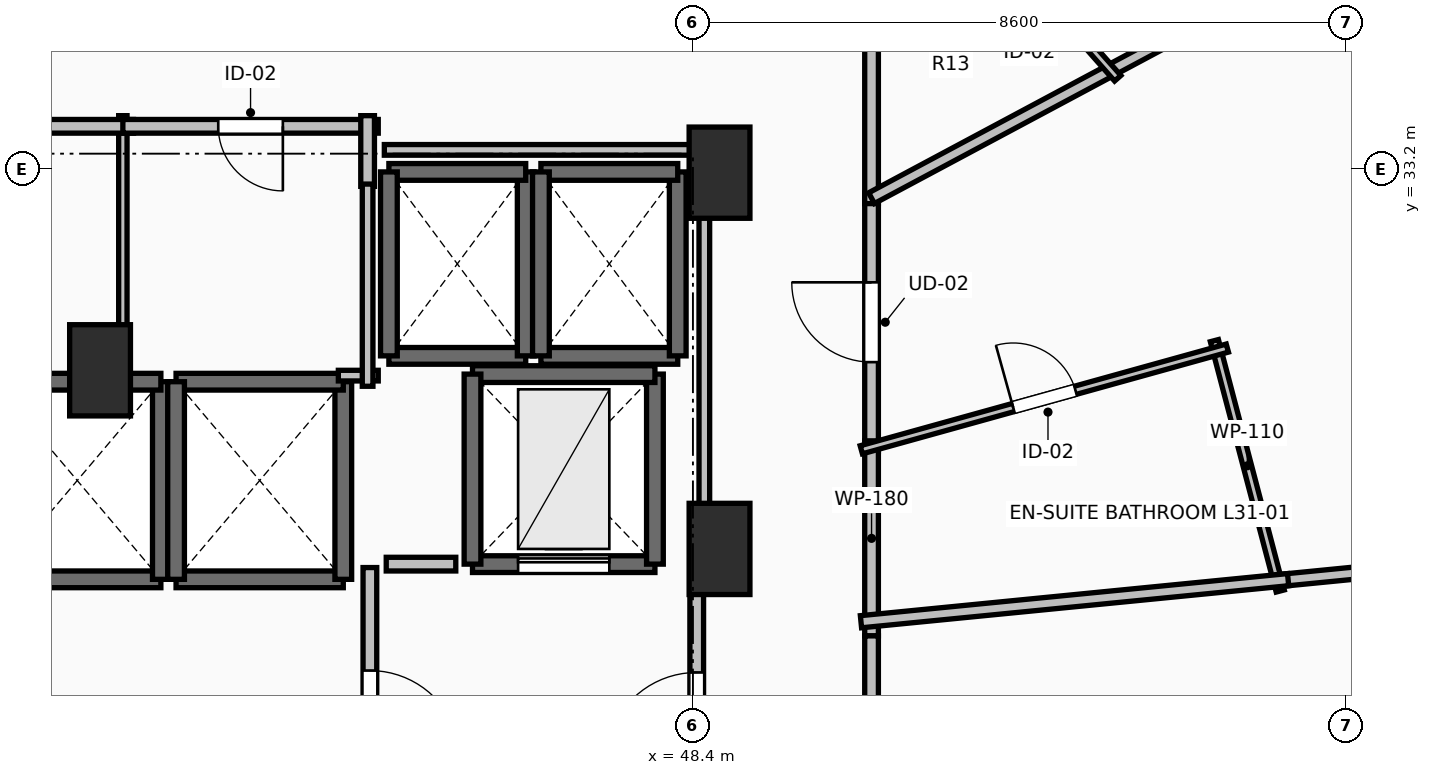
"""IFC4 building model, lengths in metres.
Left out: names, types, materials, properties, quantities, classifications, styles, units other than length and angle.
Written with IfcOpenShell. Run it as: python <this file> out.ifc"""

import sys

from ifc_helpers import new_model, si_unit, direction, frame, frame_2d, origin, origin_2d, place, context, subcontext, project, spatial, rectangle, extrude, element, fill, save


model = new_model("IFC4")
c1 = context("Model", 3, precision=1e-05, world=origin(), true_north=direction((0.0, 1.0)))
c2 = subcontext(c1, "Body", "Model", "MODEL_VIEW")
j1 = project(units=[si_unit("LENGTHUNIT", "METRE"), si_unit("PLANEANGLEUNIT", "RADIAN")], contexts=[c1])
p1 = place(None, origin())
s1 = spatial("IfcSite", under=j1, at=p1, CompositionType="ELEMENT")
p2 = place(p1, origin())
s2 = spatial("IfcBuilding", under=s1, at=p2, CompositionType="ELEMENT")
p3 = place(p2, frame((0.0, 0.0, 117.3)))
s3 = spatial("IfcBuildingStorey", under=s2, at=p3, CompositionType="ELEMENT", Elevation=117.3)
for number, where, z_axis, x_axis in (
    (1, (48.75, 33.15, 0.0), (0.0, 0.0, 1.0), (1.0, 0.0, 0.0)),
    (2, (48.75, 28.2, 0.0), (0.0, 0.0, 1.0), (1.0, 0.0, 0.0)),
    (3, (40.6, 30.55, 0.0), (0.0, 0.0, 1.0), (1.0, 0.0, 0.0)),
):
    element("IfcColumn", number, at=place(p3, frame(where, z_axis=z_axis, x_axis=x_axis)), inside=s3, PredefinedType="PILASTER", context=c2, shape_type="SweptSolid", body=[
        extrude(rectangle(XDim=0.8, YDim=1.2, at=origin_2d()), origin(), (0.0, 0.0, 1.0), 3.5),
    ])
p4 = place(p3, frame((39.2, 27.8, 0.0), z_axis=(0.0, 0.0, 1.0), x_axis=(1.0, 0.0, 0.0)))
e4 = element("IfcWall", 4, at=p4, inside=s3, PredefinedType="SOLIDWALL", context=c2, shape_type="SweptSolid", body=[
    extrude(rectangle(XDim=2.2, YDim=0.22, at=frame_2d((1.1, 0.0))), origin(), (0.0, 0.0, 1.0), 3.24),
])
p5 = place(p3, frame((41.4, 27.8, 0.0), z_axis=(0.0, 0.0, 1.0), x_axis=(0.0, 1.0, 0.0)))
e5 = element("IfcWall", 5, at=p5, inside=s3, PredefinedType="SOLIDWALL", context=c2, shape_type="SweptSolid", body=[
    extrude(rectangle(XDim=2.6, YDim=0.22, at=frame_2d((1.3, 0.0))), origin(), (0.0, 0.0, 1.0), 3.24),
])
for number, where, z_axis, x_axis in (
    (6, (41.4, 30.4, 0.0), (0.0, 0.0, 1.0), (-1.0, 0.0, 0.0)),
    (7, (41.6, 27.8, 0.0), (0.0, 0.0, 1.0), (1.0, 0.0, 0.0)),
):
    element("IfcWall", number, at=place(p3, frame(where, z_axis=z_axis, x_axis=x_axis)), inside=s3, PredefinedType="SOLIDWALL", context=c2, shape_type="SweptSolid", body=[
        extrude(rectangle(XDim=2.2, YDim=0.22, at=frame_2d((1.1, 0.0))), origin(), (0.0, 0.0, 1.0), 3.24),
    ])
p6 = place(p3, frame((43.8, 27.8, 0.0), z_axis=(0.0, 0.0, 1.0), x_axis=(0.0, 1.0, 0.0)))
e8 = element("IfcWall", 8, at=p6, inside=s3, PredefinedType="SOLIDWALL", context=c2, shape_type="SweptSolid", body=[
    extrude(rectangle(XDim=2.6, YDim=0.22, at=frame_2d((1.3, 0.0))), origin(), (0.0, 0.0, 1.0), 3.24),
])
p7 = place(p3, frame((43.8, 30.4, 0.0), z_axis=(0.0, 0.0, 1.0), x_axis=(-1.0, 0.0, 0.0)))
e9 = element("IfcWall", 9, at=p7, inside=s3, PredefinedType="SOLIDWALL", context=c2, shape_type="SweptSolid", body=[
    extrude(rectangle(XDim=2.2, YDim=0.22, at=frame_2d((1.1, 0.0))), origin(), (0.0, 0.0, 1.0), 3.24),
])
p8 = place(p3, frame((41.6, 30.4, 0.0), z_axis=(0.0, 0.0, 1.0), x_axis=(0.0, -1.0, 0.0)))
e10 = element("IfcWall", 10, at=p8, inside=s3, PredefinedType="SOLIDWALL", context=c2, shape_type="SweptSolid", body=[
    extrude(rectangle(XDim=2.6, YDim=0.22, at=frame_2d((1.3, 0.0))), origin(), (0.0, 0.0, 1.0), 3.24),
])
p9 = place(p3, frame((44.4, 30.74, 0.0), z_axis=(0.0, 0.0, 1.0), x_axis=(1.0, 0.0, 0.0)))
e11 = element("IfcWall", 11, at=p9, inside=s3, PredefinedType="SOLIDWALL", context=c2, shape_type="SweptSolid", body=[
    extrude(rectangle(XDim=1.8, YDim=0.22, at=frame_2d((0.9, 0.0))), origin(), (0.0, 0.0, 1.0), 3.24),
])
p10 = place(p3, frame((46.2, 30.74, 0.0), z_axis=(0.0, 0.0, 1.0), x_axis=(0.0, 1.0, 0.0)))
e12 = element("IfcWall", 12, at=p10, inside=s3, PredefinedType="SOLIDWALL", context=c2, shape_type="SweptSolid", body=[
    extrude(rectangle(XDim=2.42, YDim=0.22, at=frame_2d((1.21, 0.0))), origin(), (0.0, 0.0, 1.0), 3.24),
])
p11 = place(p3, frame((46.2, 33.16, 0.0), z_axis=(0.0, 0.0, 1.0), x_axis=(-1.0, 0.0, 0.0)))
e13 = element("IfcWall", 13, at=p11, inside=s3, PredefinedType="SOLIDWALL", context=c2, shape_type="SweptSolid", body=[
    extrude(rectangle(XDim=1.8, YDim=0.22, at=frame_2d((0.9, 0.0))), origin(), (0.0, 0.0, 1.0), 3.24),
])
p12 = place(p3, frame((44.4, 33.16, 0.0), z_axis=(0.0, 0.0, 1.0), x_axis=(0.0, -1.0, 0.0)))
e14 = element("IfcWall", 14, at=p12, inside=s3, PredefinedType="SOLIDWALL", context=c2, shape_type="SweptSolid", body=[
    extrude(rectangle(XDim=2.42, YDim=0.22, at=frame_2d((1.21, 0.0))), origin(), (0.0, 0.0, 1.0), 3.24),
])
p13 = place(p3, frame((46.4, 30.74, 0.0), z_axis=(0.0, 0.0, 1.0), x_axis=(1.0, 0.0, 0.0)))
e15 = element("IfcWall", 15, at=p13, inside=s3, PredefinedType="SOLIDWALL", context=c2, shape_type="SweptSolid", body=[
    extrude(rectangle(XDim=1.8, YDim=0.22, at=frame_2d((0.9, 0.0))), origin(), (0.0, 0.0, 1.0), 3.24),
])
p14 = place(p3, frame((48.2, 30.74, 0.0), z_axis=(0.0, 0.0, 1.0), x_axis=(0.0, 1.0, 0.0)))
e16 = element("IfcWall", 16, at=p14, inside=s3, PredefinedType="SOLIDWALL", context=c2, shape_type="SweptSolid", body=[
    extrude(rectangle(XDim=2.42, YDim=0.22, at=frame_2d((1.21, 0.0))), origin(), (0.0, 0.0, 1.0), 3.24),
])
p15 = place(p3, frame((48.2, 33.16, 0.0), z_axis=(0.0, 0.0, 1.0), x_axis=(-1.0, 0.0, 0.0)))
e17 = element("IfcWall", 17, at=p15, inside=s3, PredefinedType="SOLIDWALL", context=c2, shape_type="SweptSolid", body=[
    extrude(rectangle(XDim=1.8, YDim=0.22, at=frame_2d((0.9, 0.0))), origin(), (0.0, 0.0, 1.0), 3.24),
])
p16 = place(p3, frame((46.4, 33.16, 0.0), z_axis=(0.0, 0.0, 1.0), x_axis=(0.0, -1.0, 0.0)))
e18 = element("IfcWall", 18, at=p16, inside=s3, PredefinedType="SOLIDWALL", context=c2, shape_type="SweptSolid", body=[
    extrude(rectangle(XDim=2.42, YDim=0.22, at=frame_2d((1.21, 0.0))), origin(), (0.0, 0.0, 1.0), 3.24),
])
p17 = place(p3, frame((45.5, 28.0, 0.0), z_axis=(0.0, 0.0, 1.0), x_axis=(1.0, 0.0, 0.0)))
e19 = element("IfcWall", 19, at=p17, inside=s3, PredefinedType="SHEAR", context=c2, shape_type="SweptSolid", body=[
    extrude(rectangle(XDim=2.4, YDim=0.22, at=frame_2d((1.2, 0.0))), origin(), (0.0, 0.0, 1.0), 3.24),
])
p18 = place(p17, frame((0.6, 0.0, 0.0)))
e20 = element("IfcOpeningElement", 20, at=p18, cuts=e19, PredefinedType="OPENING", context=c2, shape_type="SweptSolid", body=[
    extrude(rectangle(XDim=1.2, YDim=2.2, at=frame_2d((0.6, 1.1))), frame((0.0, 0.125, 0.0), z_axis=(0.0, -1.0, 0.0), x_axis=(1.0, 0.0, 0.0)), (0.0, 0.0, 1.0), 0.25),
])
p19 = place(p3, frame((47.9, 28.0, 0.0), z_axis=(0.0, 0.0, 1.0), x_axis=(0.0, 1.0, 0.0)))
e21 = element("IfcWall", 21, at=p19, inside=s3, PredefinedType="SHEAR", context=c2, shape_type="SweptSolid", body=[
    extrude(rectangle(XDim=2.5, YDim=0.22, at=frame_2d((1.25, 0.0))), origin(), (0.0, 0.0, 1.0), 3.24),
])
p20 = place(p3, frame((47.9, 30.5, 0.0), z_axis=(0.0, 0.0, 1.0), x_axis=(-1.0, 0.0, 0.0)))
e22 = element("IfcWall", 22, at=p20, inside=s3, PredefinedType="SHEAR", context=c2, shape_type="SweptSolid", body=[
    extrude(rectangle(XDim=2.4, YDim=0.22, at=frame_2d((1.2, 0.0))), origin(), (0.0, 0.0, 1.0), 3.24),
])
p21 = place(p3, frame((45.5, 30.5, 0.0), z_axis=(0.0, 0.0, 1.0), x_axis=(0.0, -1.0, 0.0)))
e23 = element("IfcWall", 23, at=p21, inside=s3, PredefinedType="SHEAR", context=c2, shape_type="SweptSolid", body=[
    extrude(rectangle(XDim=2.5, YDim=0.22, at=frame_2d((1.25, 0.0))), origin(), (0.0, 0.0, 1.0), 3.24),
])
p22 = place(p3, frame((44.15, 27.955, 0.0), z_axis=(0.0, 0.0, 1.0), x_axis=(0.0, -1.0, 0.0)))
e24 = element("IfcWall", 24, at=p22, inside=s3, PredefinedType="PARTITIONING", context=c2, shape_type="SweptSolid", body=[
    extrude(rectangle(XDim=3.91, YDim=0.18, at=frame_2d((1.955, 0.0))), origin(), (0.0, 0.0, 1.0), 3.24),
])
p23 = place(p22, frame((1.355, 0.0, 0.0)))
e25 = element("IfcOpeningElement", 25, at=p23, cuts=e24, PredefinedType="OPENING", context=c2, shape_type="SweptSolid", body=[
    extrude(rectangle(XDim=1.2, YDim=2.15, at=frame_2d((0.6, 1.075))), frame((0.0, 0.105, 0.0), z_axis=(0.0, -1.0, 0.0), x_axis=(1.0, 0.0, 0.0)), (0.0, 0.0, 1.0), 0.21),
])
p24 = place(p3, frame((48.45, 23.95, 0.0), z_axis=(0.0, 0.0, 1.0), x_axis=(0.0, 1.0, 0.0)))
e26 = element("IfcWall", 26, at=p24, inside=s3, PredefinedType="PARTITIONING", context=c2, shape_type="SweptSolid", body=[
    extrude(rectangle(XDim=4.05, YDim=0.18, at=frame_2d((2.025, 0.0))), origin(), (0.0, 0.0, 1.0), 3.24),
])
p25 = place(p24, frame((1.425, 0.0, 0.0)))
e27 = element("IfcOpeningElement", 27, at=p25, cuts=e26, PredefinedType="OPENING", context=c2, shape_type="SweptSolid", body=[
    extrude(rectangle(XDim=1.2, YDim=2.15, at=frame_2d((0.6, 1.075))), frame((0.0, 0.105, 0.0), z_axis=(0.0, -1.0, 0.0), x_axis=(1.0, 0.0, 0.0)), (0.0, 0.0, 1.0), 0.21),
])
p26 = place(p3, frame((40.9, 30.34, 0.0), z_axis=(0.0, 0.0, 1.0), x_axis=(0.0, 1.0, 0.0)))
e28 = element("IfcWall", 28, at=p26, inside=s3, PredefinedType="PARTITIONING", context=c2, shape_type="SweptSolid", body=[
    extrude(rectangle(XDim=3.56, YDim=0.11, at=frame_2d((1.78, 0.0))), origin(), (0.0, 0.0, 1.0), 3.24),
])
p27 = place(p3, frame((41.04, 33.76, 0.0), z_axis=(0.0, 0.0, 1.0), x_axis=(-1.0, 0.0, 0.0)))
e29 = element("IfcWall", 29, at=p27, inside=s3, PredefinedType="PARTITIONING", context=c2, shape_type="SweptSolid", body=[
    extrude(rectangle(XDim=4.84, YDim=0.18, at=frame_2d((2.42, 0.0))), origin(), (0.0, 0.0, 1.0), 3.24),
])
p28 = place(p27, frame((1.995, 0.0, 0.0)))
e30 = element("IfcOpeningElement", 30, at=p28, cuts=e29, PredefinedType="OPENING", context=c2, shape_type="SweptSolid", body=[
    extrude(rectangle(XDim=0.85, YDim=2.1, at=frame_2d((0.425, 1.05))), frame((0.0, 0.105, 0.0), z_axis=(0.0, -1.0, 0.0), x_axis=(1.0, 0.0, 0.0)), (0.0, 0.0, 1.0), 0.21),
])
p29 = place(p3, frame((44.26, 33.76, 0.0), z_axis=(0.0, 0.0, 1.0), x_axis=(-1.0, 0.0, 0.0)))
e31 = element("IfcWall", 31, at=p29, inside=s3, PredefinedType="PARTITIONING", context=c2, shape_type="SweptSolid", body=[
    extrude(rectangle(XDim=3.36, YDim=0.18, at=frame_2d((1.68, 0.0))), origin(), (0.0, 0.0, 1.0), 3.24),
])
p30 = place(p29, frame((1.255, 0.0, 0.0)))
e32 = element("IfcOpeningElement", 32, at=p30, cuts=e31, PredefinedType="OPENING", context=c2, shape_type="SweptSolid", body=[
    extrude(rectangle(XDim=0.85, YDim=2.1, at=frame_2d((0.425, 1.05))), frame((0.0, 0.105, 0.0), z_axis=(0.0, -1.0, 0.0), x_axis=(1.0, 0.0, 0.0)), (0.0, 0.0, 1.0), 0.21),
])
p31 = place(p3, frame((44.12, 32.97, 0.0), z_axis=(0.0, 0.0, 1.0), x_axis=(0.0, 1.0, 0.0)))
e33 = element("IfcWall", 33, at=p31, inside=s3, PredefinedType="PARTITIONING", context=c2, shape_type="SweptSolid", body=[
    extrude(rectangle(XDim=0.93, YDim=0.18, at=frame_2d((0.465, 0.0))), origin(), (0.0, 0.0, 1.0), 3.24),
])
p32 = place(p3, frame((50.75, 29.482, 0.0), z_axis=(0.0, 0.0, 1.0), x_axis=(0.0, 1.0, 0.0)))
e34 = element("IfcWall", 34, at=p32, inside=s3, PredefinedType="PARTITIONING", context=c2, shape_type="SweptSolid", body=[
    extrude(rectangle(XDim=3.401, YDim=0.18, at=frame_2d((1.701, 0.0))), origin(), (0.0, 0.0, 1.0), 2.432),
])
p33 = place(p32, frame((1.176, 0.0, 0.0)))
e35 = element("IfcOpeningElement", 35, at=p33, cuts=e34, PredefinedType="OPENING", context=c2, shape_type="SweptSolid", body=[
    extrude(rectangle(XDim=1.05, YDim=2.2, at=frame_2d((0.525, 1.1))), frame((0.0, 0.105, 0.0), z_axis=(0.0, -1.0, 0.0), x_axis=(1.0, 0.0, 0.0)), (0.0, 0.0, 1.0), 0.21),
])
p34 = place(p3, frame((50.75, 27.056, 0.0), z_axis=(0.0, 0.0, 1.0), x_axis=(0.0, 1.0, 0.0)))
e36 = element("IfcWall", 36, at=p34, inside=s3, PredefinedType="PARTITIONING", context=c2, shape_type="SweptSolid", body=[
    extrude(rectangle(XDim=2.566, YDim=0.18, at=frame_2d((1.283, 0.0))), origin(), (0.0, 0.0, 1.0), 2.432),
])
p35 = place(p3, frame((50.75, 32.743, 0.0), z_axis=(0.0, 0.0, 1.0), x_axis=(0.0, 1.0, 0.0)))
e37 = element("IfcWall", 37, at=p35, inside=s3, PredefinedType="PARTITIONING", context=c2, shape_type="SweptSolid", body=[
    extrude(rectangle(XDim=3.347, YDim=0.18, at=frame_2d((1.674, 0.0))), origin(), (0.0, 0.0, 1.0), 2.432),
])
p36 = place(p3, frame((50.75, 15.596, 0.0), z_axis=(0.0, 0.0, 1.0), x_axis=(0.0, 1.0, 0.0)))
e38 = element("IfcWall", 38, at=p36, inside=s3, PredefinedType="PARTITIONING", context=c2, shape_type="SweptSolid", body=[
    extrude(rectangle(XDim=11.46, YDim=0.18, at=frame_2d((5.73, 0.0))), origin(), (0.0, 0.0, 1.0), 2.432),
])
p37 = place(p36, frame((5.23, 0.0, 0.0)))
e39 = element("IfcOpeningElement", 39, at=p37, cuts=e38, PredefinedType="OPENING", context=c2, shape_type="SweptSolid", body=[
    extrude(rectangle(XDim=1.0, YDim=2.15, at=frame_2d((0.5, 1.075))), frame((0.0, 0.105, 0.0), z_axis=(0.0, -1.0, 0.0), x_axis=(1.0, 0.0, 0.0)), (0.0, 0.0, 1.0), 0.21),
])
p38 = place(p3, frame((55.26, 30.94, 0.0), z_axis=(0.0, 0.0, 1.0), x_axis=(0.254323935255, -0.967119090886, 0.0)))
e40 = element("IfcWall", 40, at=p38, inside=s3, PredefinedType="PARTITIONING", context=c2, shape_type="SweptSolid", body=[
    extrude(rectangle(XDim=3.406, YDim=0.11, at=frame_2d((1.703, 0.0))), origin(), (0.0, 0.0, 1.0), 2.929),
])
p39 = place(p3, frame((50.615, 29.504, 0.0), z_axis=(0.0, 0.0, 1.0), x_axis=(0.963498313434, 0.267714400078, 0.0)))
e41 = element("IfcWall", 41, at=p39, inside=s3, PredefinedType="PARTITIONING", context=c2, shape_type="SweptSolid", body=[
    extrude(rectangle(XDim=4.998, YDim=0.11, at=frame_2d((2.499, 0.0))), origin(), (0.0, 0.0, 1.0), 2.874),
])
p40 = place(p39, frame((2.074, 0.0, 0.0)))
e42 = element("IfcOpeningElement", 42, at=p40, cuts=e41, PredefinedType="OPENING", context=c2, shape_type="SweptSolid", body=[
    extrude(rectangle(XDim=0.85, YDim=2.1, at=frame_2d((0.425, 1.05))), frame((0.0, 0.07, 0.0), z_axis=(0.0, -1.0, 0.0), x_axis=(1.0, 0.0, 0.0)), (0.0, 0.0, 1.0), 0.14),
])
p41 = place(p3, frame((59.384, 37.43, 0.0), z_axis=(0.0, 0.0, 1.0), x_axis=(-0.881921122551, -0.471397002109, 0.0)))
e43 = element("IfcWall", 43, at=p41, inside=s3, PredefinedType="PARTITIONING", context=c2, shape_type="SweptSolid", body=[
    extrude(rectangle(XDim=9.79, YDim=0.16, at=frame_2d((4.895, 0.0))), origin(), (0.0, 0.0, 1.0), 2.432),
])
p42 = place(p3, frame((56.091, 27.782, 0.0), z_axis=(0.0, 0.0, 1.0), x_axis=(0.995182127762, 0.098043523927, 0.0)))
e44 = element("IfcWall", 44, at=p42, inside=s3, PredefinedType="PARTITIONING", context=c2, shape_type="SweptSolid", body=[
    extrude(rectangle(XDim=7.864, YDim=0.16, at=frame_2d((3.932, 0.0))), origin(), (0.0, 0.0, 1.0), 2.677),
])
p43 = place(p3, frame((50.611, 27.242, 0.0), z_axis=(0.0, 0.0, 1.0), x_axis=(0.995185043486, 0.098013923607, 0.0)))
e45 = element("IfcWall", 45, at=p43, inside=s3, PredefinedType="PARTITIONING", context=c2, shape_type="SweptSolid", body=[
    extrude(rectangle(XDim=5.647, YDim=0.16, at=frame_2d((2.823, 0.0))), origin(), (0.0, 0.0, 1.0), 2.432),
])
p44 = place(p3, frame((51.936, 36.714, 0.0), z_axis=(0.0, 0.0, 1.0), x_axis=(0.662322264705, -0.749219071885, 0.0)))
e46 = element("IfcWall", 46, at=p44, inside=s3, PredefinedType="PARTITIONING", context=c2, shape_type="SweptSolid", body=[
    extrude(rectangle(XDim=3.099, YDim=0.11, at=frame_2d((1.549, 0.0))), origin(), (0.0, 0.0, 1.0), 2.432),
])
p45 = place(p44, frame((1.125, 0.0, 0.0)))
e47 = element("IfcOpeningElement", 47, at=p45, cuts=e46, PredefinedType="OPENING", context=c2, shape_type="SweptSolid", body=[
    extrude(rectangle(XDim=0.85, YDim=2.1, at=frame_2d((0.425, 1.05))), frame((0.0, 0.07, 0.0), z_axis=(0.0, -1.0, 0.0), x_axis=(1.0, 0.0, 0.0)), (0.0, 0.0, 1.0), 0.14),
])
p46 = place(p3, frame((45.28, 28.0, 0.0), z_axis=(0.0, 0.0, 1.0), x_axis=(-1.0, 0.0, 0.0)))
e48 = element("IfcWall", 48, at=p46, inside=s3, PredefinedType="PARTITIONING", context=c2, shape_type="SweptSolid", body=[
    extrude(rectangle(XDim=0.915, YDim=0.18, at=frame_2d((0.458, 0.0))), origin(), (0.0, 0.0, 1.0), 3.24),
])
p47 = place(p3, frame((43.735, 30.48, 0.0), z_axis=(0.0, 0.0, 1.0), x_axis=(1.0, 0.0, 0.0)))
e49 = element("IfcWall", 49, at=p47, inside=s3, PredefinedType="PARTITIONING", context=c2, shape_type="SweptSolid", body=[
    extrude(rectangle(XDim=0.525, YDim=0.14, at=frame_2d((0.262, 0.0))), origin(), (0.0, 0.0, 1.0), 3.24),
])
p48 = place(p3, frame((44.12, 30.34, 0.0), z_axis=(0.0, 0.0, 1.0), x_axis=(0.0, 1.0, 0.0)))
e50 = element("IfcWall", 50, at=p48, inside=s3, PredefinedType="PARTITIONING", context=c2, shape_type="SweptSolid", body=[
    extrude(rectangle(XDim=2.66, YDim=0.14, at=frame_2d((1.33, 0.0))), origin(), (0.0, 0.0, 1.0), 3.24),
])
p49 = place(p3, frame((44.34, 33.45, 0.0), z_axis=(0.0, 0.0, 1.0), x_axis=(1.0, 0.0, 0.0)))
e51 = element("IfcWall", 51, at=p49, inside=s3, PredefinedType="PARTITIONING", context=c2, shape_type="SweptSolid", body=[
    extrude(rectangle(XDim=4.21, YDim=0.14, at=frame_2d((2.105, 0.0))), origin(), (0.0, 0.0, 1.0), 2.432),
])
p50 = place(p3, frame((48.55, 33.45, 0.0), z_axis=(0.0, 0.0, 1.0), x_axis=(0.0, -1.0, 0.0)))
e52 = element("IfcWall", 52, at=p50, inside=s3, PredefinedType="PARTITIONING", context=c2, shape_type="SweptSolid", body=[
    extrude(rectangle(XDim=5.254, YDim=0.14, at=frame_2d((2.627, 0.0))), origin(), (0.0, 0.0, 1.0), 2.432),
])
p51 = place(p18, origin())
e53 = element("IfcDoor", 53, at=p51, inside=s3, OperationType="SLIDING_TO_LEFT", PredefinedType="DOOR", context=c2, shape_type="SweptSolid", body=[
    extrude(rectangle(XDim=1.2, YDim=2.2, at=frame_2d((0.6, 1.1))), frame((0.0, 0.025, 0.0), z_axis=(0.0, -1.0, 0.0), x_axis=(1.0, 0.0, 0.0)), (0.0, 0.0, 1.0), 0.05),
])
fill(e20, e53)
p52 = place(p23, origin())
e54 = element("IfcDoor", 54, at=p52, inside=s3, OperationType="SINGLE_SWING_RIGHT", PredefinedType="DOOR", context=c2, shape_type="SweptSolid", body=[
    extrude(rectangle(XDim=1.2, YDim=2.15, at=frame_2d((0.6, 1.075))), frame((0.0, 0.025, 0.0), z_axis=(0.0, -1.0, 0.0), x_axis=(1.0, 0.0, 0.0)), (0.0, 0.0, 1.0), 0.05),
])
fill(e25, e54)
p53 = place(p25, origin())
e55 = element("IfcDoor", 55, at=p53, inside=s3, OperationType="SINGLE_SWING_LEFT", PredefinedType="DOOR", context=c2, shape_type="SweptSolid", body=[
    extrude(rectangle(XDim=1.2, YDim=2.15, at=frame_2d((0.6, 1.075))), frame((0.0, 0.025, 0.0), z_axis=(0.0, -1.0, 0.0), x_axis=(1.0, 0.0, 0.0)), (0.0, 0.0, 1.0), 0.05),
])
fill(e27, e55)
p54 = place(p30, origin())
e56 = element("IfcDoor", 56, at=p54, inside=s3, OperationType="SINGLE_SWING_LEFT", PredefinedType="DOOR", context=c2, shape_type="SweptSolid", body=[
    extrude(rectangle(XDim=0.85, YDim=2.1, at=frame_2d((0.425, 1.05))), frame((0.0, 0.025, 0.0), z_axis=(0.0, -1.0, 0.0), x_axis=(1.0, 0.0, 0.0)), (0.0, 0.0, 1.0), 0.05),
])
fill(e32, e56)
p55 = place(p33, origin())
e57 = element("IfcDoor", 57, at=p55, inside=s3, OperationType="SINGLE_SWING_RIGHT", PredefinedType="DOOR", context=c2, shape_type="SweptSolid", body=[
    extrude(rectangle(XDim=1.05, YDim=2.2, at=frame_2d((0.525, 1.1))), frame((0.0, 0.025, 0.0), z_axis=(0.0, -1.0, 0.0), x_axis=(1.0, 0.0, 0.0)), (0.0, 0.0, 1.0), 0.05),
])
fill(e35, e57)
p56 = place(p40, origin())
e58 = element("IfcDoor", 58, at=p56, inside=s3, OperationType="SINGLE_SWING_LEFT", PredefinedType="DOOR", context=c2, shape_type="SweptSolid", body=[
    extrude(rectangle(XDim=0.85, YDim=2.1, at=frame_2d((0.425, 1.05))), frame((0.0, 0.025, 0.0), z_axis=(0.0, -1.0, 0.0), x_axis=(1.0, 0.0, 0.0)), (0.0, 0.0, 1.0), 0.05),
])
fill(e42, e58)
save(model, sys.argv[1])
